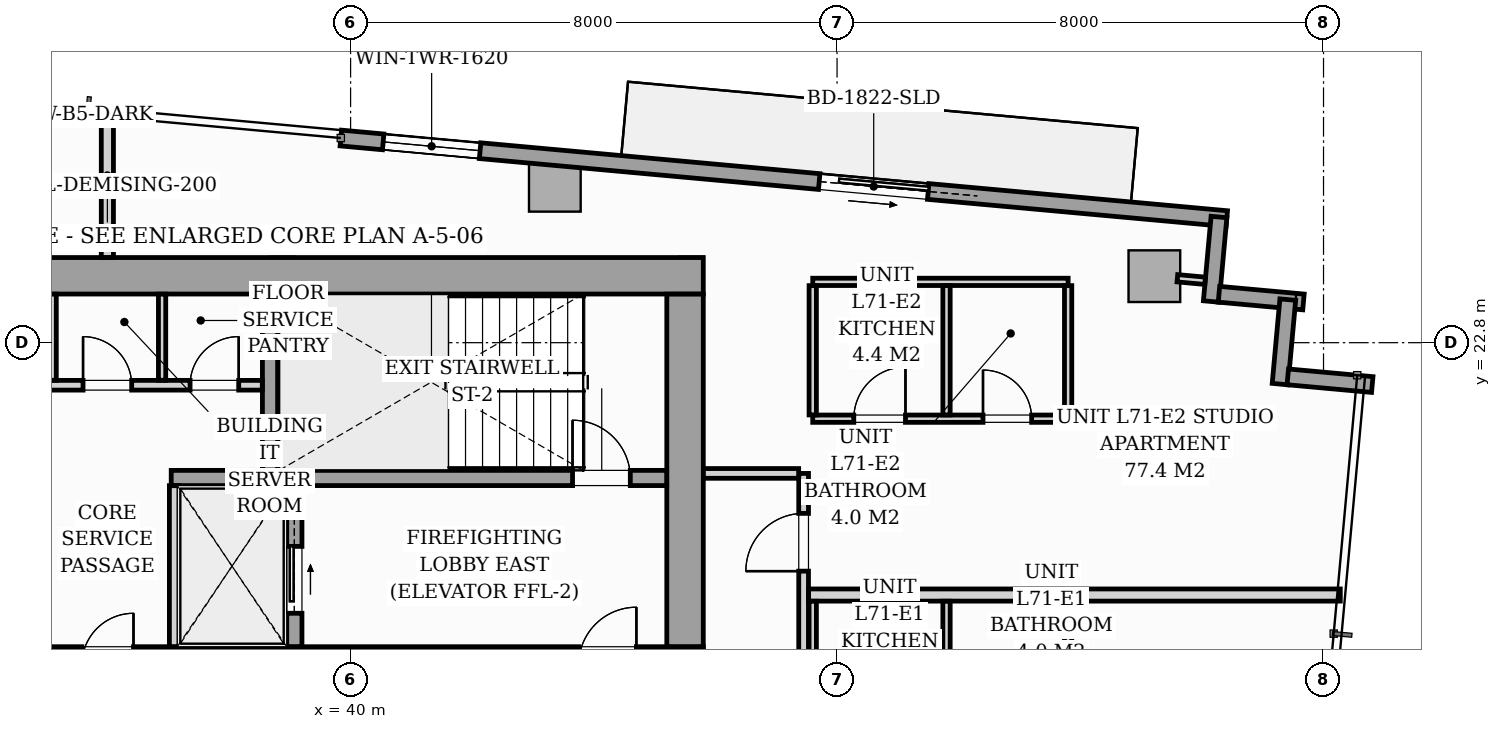
"""IFC4 building model, lengths in metres.
Left out: names, types, materials, properties, quantities, classifications, styles, units other than length and angle.
Written with IfcOpenShell. Run it as: python <this file> out.ifc"""

import sys

from ifc_helpers import new_model, si_unit, direction, frame, frame_2d, origin, origin_2d, place, context, subcontext, project, spatial, rectangle, i_section, extrude, source, transform, mapped, element, fill, save


model = new_model("IFC4")
c1 = context("Model", 3, precision=1e-05, world=origin(), true_north=direction((0.0, 1.0)))
c2 = subcontext(c1, "Body", "Model", "MODEL_VIEW")
j1 = project(units=[si_unit("LENGTHUNIT", "METRE"), si_unit("PLANEANGLEUNIT", "RADIAN")], contexts=[c1])
p1 = place(None, origin())
s1 = spatial("IfcSite", under=j1, at=p1, CompositionType="ELEMENT")
p2 = place(p1, origin())
s2 = spatial("IfcBuilding", under=s1, at=p2, CompositionType="ELEMENT")
p3 = place(p2, frame((0.0, 0.0, 246.3)))
s3 = spatial("IfcBuildingStorey", under=s2, at=p3, CompositionType="ELEMENT", Elevation=246.3)
m1 = source(origin(), c2, "Body", "SweptSolid", [
    extrude(i_section(OverallWidth=0.409, OverallDepth=0.425, WebThickness=0.033, FlangeThickness=0.052, FilletRadius=0.018, at=origin_2d()), origin(), (0.0, 0.0, 1.0), 3.296),
])
for number, where, z_axis, x_axis in (
    (1, (38.88, 24.0, 0.002), (0.0, 0.0, 1.0), (1.0, 0.0, 0.0)),
    (2, (45.6, 24.0, 0.002), (0.0, 0.0, 1.0), (1.0, 0.0, 0.0)),
):
    element("IfcColumn", number, at=place(p3, frame(where, z_axis=z_axis, x_axis=x_axis)), inside=s3, PredefinedType="PILASTER", context=c2, shape_type="MappedRepresentation", body=[
        mapped(m1, transform((0.0, 0.0, 0.0), scale=1.0)),
    ])
m2 = source(origin(), c2, "Body", "SweptSolid", [
    extrude(rectangle(XDim=0.85, YDim=0.85, at=origin_2d()), origin(), (0.0, 0.0, 1.0), 3.296),
])
for number, where, z_axis, x_axis in (
    (3, (43.359, 25.38, 0.002), (0.0, 0.0, 1.0), (0.996, -0.091, 0.0)),
    (4, (53.218, 23.894, 0.002), (0.0, 0.0, 1.0), (0.996, -0.091, 0.0)),
):
    element("IfcColumn", number, at=place(p3, frame(where, z_axis=z_axis, x_axis=x_axis)), inside=s3, PredefinedType="COLUMN", context=c2, shape_type="MappedRepresentation", body=[
        mapped(m2, transform((0.0, 0.0, 0.0), scale=1.0)),
    ])
p4 = place(p3, frame((39.839, 26.166, 0.0), z_axis=(0.0, 0.0, 1.0), x_axis=(0.995884447498, -0.090632043071, 0.0)))
e5 = element("IfcWall", 5, at=p4, inside=s3, PredefinedType="STANDARD", context=c2, shape_type="SweptSolid", body=[
    extrude(rectangle(XDim=14.63, YDim=0.26, at=frame_2d((7.315, 0.0))), origin(), (0.0, 0.0, 1.0), 3.04),
])
p5 = place(p4, frame((7.9, 0.0, 0.0)))
e6 = element("IfcOpeningElement", 6, at=p5, cuts=e5, PredefinedType="OPENING", context=c2, shape_type="SweptSolid", body=[
    extrude(rectangle(XDim=1.8, YDim=2.06, at=frame_2d((0.9, 1.03))), frame((0.0, 0.14, 0.0), z_axis=(0.0, -1.0, 0.0), x_axis=(1.0, 0.0, 0.0)), (0.0, 0.0, 1.0), 0.28),
])
p6 = place(p4, frame((0.7, 0.0, 0.65)))
e7 = element("IfcOpeningElement", 7, at=p6, cuts=e5, PredefinedType="OPENING", context=c2, shape_type="SweptSolid", body=[
    extrude(rectangle(XDim=1.6, YDim=1.5, at=frame_2d((0.8, 0.75))), frame((0.0, 0.14, 0.0), z_axis=(0.0, -1.0, 0.0), x_axis=(1.0, 0.0, 0.0)), (0.0, 0.0, 1.0), 0.28),
])
p7 = place(p3, frame((54.281, 24.866, 0.0), z_axis=(0.0, 0.0, 1.0), x_axis=(-0.090661991521, -0.995881721538, 0.0)))
e8 = element("IfcWall", 8, at=p7, inside=s3, PredefinedType="STANDARD", context=c2, shape_type="SweptSolid", body=[
    extrude(rectangle(XDim=1.395, YDim=0.26, at=frame_2d((0.698, 0.0))), origin(), (0.0, 0.0, 1.0), 3.04),
])
for number, where, z_axis, x_axis in (
    (9, (54.281, 23.596, 0.0), (0.0, 0.0, 1.0), (0.996, -0.091, 0.0)),
    (10, (55.412, 23.508, 0.0), (0.0, 0.0, 1.0), (-0.091, -0.996, 0.0)),
    (11, (55.412, 22.238, 0.0), (0.0, 0.0, 1.0), (0.996, -0.091, 0.0)),
):
    element("IfcWall", number, at=place(p3, frame(where, z_axis=z_axis, x_axis=x_axis)), inside=s3, PredefinedType="STANDARD", context=c2, shape_type="SweptSolid", body=[
        extrude(rectangle(XDim=1.395, YDim=0.26, at=frame_2d((0.698, 0.0))), origin(), (0.0, 0.0, 1.0), 3.04),
    ])
p8 = place(p3, frame((26.2, 17.5, 0.0), z_axis=(0.0, 0.0, 1.0), x_axis=(1.0, 0.0, 0.0)))
e12 = element("IfcWall", 12, at=p8, inside=s3, PredefinedType="SHEAR", context=c2, shape_type="SweptSolid", body=[
    extrude(rectangle(XDim=19.6, YDim=0.6, at=frame_2d((9.8, 0.0))), origin(), (0.0, 0.0, 1.0), 3.3),
])
p9 = place(p8, frame((0.95, 0.0, 0.0)))
e13 = element("IfcOpeningElement", 13, at=p9, cuts=e12, PredefinedType="OPENING", context=c2, shape_type="SweptSolid", body=[
    extrude(rectangle(XDim=0.95, YDim=2.06, at=frame_2d((0.475, 1.03))), frame((0.0, 0.31, 0.0), z_axis=(0.0, -1.0, 0.0), x_axis=(1.0, 0.0, 0.0)), (0.0, 0.0, 1.0), 0.62),
])
p10 = place(p8, frame((9.38, 0.0, 0.0)))
e14 = element("IfcOpeningElement", 14, at=p10, cuts=e12, PredefinedType="OPENING", context=c2, shape_type="SweptSolid", body=[
    extrude(rectangle(XDim=0.85, YDim=2.0, at=frame_2d((0.425, 1.0))), frame((0.0, 0.31, 0.0), z_axis=(0.0, -1.0, 0.0), x_axis=(1.0, 0.0, 0.0)), (0.0, 0.0, 1.0), 0.62),
])
p11 = place(p8, frame((17.55, 0.0, 0.0)))
e15 = element("IfcOpeningElement", 15, at=p11, cuts=e12, PredefinedType="OPENING", context=c2, shape_type="SweptSolid", body=[
    extrude(rectangle(XDim=0.95, YDim=2.06, at=frame_2d((0.475, 1.03))), frame((0.0, 0.31, 0.0), z_axis=(0.0, -1.0, 0.0), x_axis=(1.0, 0.0, 0.0)), (0.0, 0.0, 1.0), 0.62),
])
p12 = place(p3, frame((26.2, 23.9, 0.0), z_axis=(0.0, 0.0, 1.0), x_axis=(1.0, 0.0, 0.0)))
e16 = element("IfcWall", 16, at=p12, inside=s3, PredefinedType="SHEAR", context=c2, shape_type="SweptSolid", body=[
    extrude(rectangle(XDim=19.6, YDim=0.6, at=frame_2d((9.8, 0.0))), origin(), (0.0, 0.0, 1.0), 3.3),
])
p13 = place(p3, frame((45.5, 17.802, 0.0), z_axis=(0.0, 0.0, 1.0), x_axis=(0.0, 1.0, 0.0)))
e17 = element("IfcWall", 17, at=p13, inside=s3, PredefinedType="SHEAR", context=c2, shape_type="SweptSolid", body=[
    extrude(rectangle(XDim=5.796, YDim=0.6, at=frame_2d((2.898, 0.0))), origin(), (0.0, 0.0, 1.0), 3.3),
])
p14 = place(p3, frame((37.05, 20.575, 0.0), z_axis=(0.0, 0.0, 1.0), x_axis=(1.0, 0.0, 0.0)))
e18 = element("IfcWall", 18, at=p14, inside=s3, PredefinedType="SOLIDWALL", context=c2, shape_type="SweptSolid", body=[
    extrude(rectangle(XDim=8.148, YDim=0.25, at=frame_2d((4.074, 0.0))), origin(), (0.0, 0.0, 1.0), 3.3),
])
p15 = place(p14, frame((6.6, 0.0, 0.0)))
e19 = element("IfcOpeningElement", 19, at=p15, cuts=e18, PredefinedType="OPENING", context=c2, shape_type="SweptSolid", body=[
    extrude(rectangle(XDim=0.95, YDim=2.06, at=frame_2d((0.475, 1.03))), frame((0.0, 0.135, 0.0), z_axis=(0.0, -1.0, 0.0), x_axis=(1.0, 0.0, 0.0)), (0.0, 0.0, 1.0), 0.27),
])
p16 = place(p3, frame((38.675, 20.702, 0.0), z_axis=(0.0, 0.0, 1.0), x_axis=(0.0, 1.0, 0.0)))
e20 = element("IfcWall", 20, at=p16, inside=s3, PredefinedType="SOLIDWALL", context=c2, shape_type="SweptSolid", body=[
    extrude(rectangle(XDim=2.896, YDim=0.25, at=frame_2d((1.448, 0.0))), origin(), (0.0, 0.0, 1.0), 3.3),
])
p17 = place(p3, frame((37.1, 17.802, 0.0), z_axis=(0.0, 0.0, 1.0), x_axis=(0.0, 1.0, 0.0)))
e21 = element("IfcWall", 21, at=p17, inside=s3, PredefinedType="PARTITIONING", context=c2, shape_type="SweptSolid", body=[
    extrude(rectangle(XDim=2.646, YDim=0.16, at=frame_2d((1.323, 0.0))), origin(), (0.0, 0.0, 1.0), 3.04),
])
p18 = place(p3, frame((39.075, 17.802, 0.0), z_axis=(0.0, 0.0, 1.0), x_axis=(0.0, 1.0, 0.0)))
e22 = element("IfcWall", 22, at=p18, inside=s3, PredefinedType="SOLIDWALL", context=c2, shape_type="SweptSolid", body=[
    extrude(rectangle(XDim=2.646, YDim=0.25, at=frame_2d((1.323, 0.0))), origin(), (0.0, 0.0, 1.0), 3.3),
])
p19 = place(p18, frame((0.548, 0.0, 0.0)))
e23 = element("IfcOpeningElement", 23, at=p19, cuts=e22, PredefinedType="OPENING", context=c2, shape_type="SweptSolid", body=[
    extrude(rectangle(XDim=1.1, YDim=2.08, at=frame_2d((0.55, 1.04))), frame((0.0, 0.135, 0.0), z_axis=(0.0, -1.0, 0.0), x_axis=(1.0, 0.0, 0.0)), (0.0, 0.0, 1.0), 0.27),
])
p20 = place(p3, frame((33.452, 22.1, 0.0), z_axis=(0.0, 0.0, 1.0), x_axis=(1.0, 0.0, 0.0)))
e24 = element("IfcWall", 24, at=p20, inside=s3, PredefinedType="PARTITIONING", context=c2, shape_type="SweptSolid", body=[
    extrude(rectangle(XDim=5.096, YDim=0.16, at=frame_2d((2.548, 0.0))), origin(), (0.0, 0.0, 1.0), 3.04),
])
p21 = place(p20, frame((0.388, 0.0, 0.0)))
e25 = element("IfcOpeningElement", 25, at=p21, cuts=e24, PredefinedType="OPENING", context=c2, shape_type="SweptSolid", body=[
    extrude(rectangle(XDim=0.8, YDim=2.05, at=frame_2d((0.4, 1.025))), frame((0.0, 0.09, 0.0), z_axis=(0.0, -1.0, 0.0), x_axis=(1.0, 0.0, 0.0)), (0.0, 0.0, 1.0), 0.18),
])
p22 = place(p20, frame((2.148, 0.0, 0.0)))
e26 = element("IfcOpeningElement", 26, at=p22, cuts=e24, PredefinedType="OPENING", context=c2, shape_type="SweptSolid", body=[
    extrude(rectangle(XDim=0.8, YDim=2.05, at=frame_2d((0.4, 1.025))), frame((0.0, 0.09, 0.0), z_axis=(0.0, -1.0, 0.0), x_axis=(1.0, 0.0, 0.0)), (0.0, 0.0, 1.0), 0.18),
])
p23 = place(p20, frame((3.908, 0.0, 0.0)))
e27 = element("IfcOpeningElement", 27, at=p23, cuts=e24, PredefinedType="OPENING", context=c2, shape_type="SweptSolid", body=[
    extrude(rectangle(XDim=0.8, YDim=2.05, at=frame_2d((0.4, 1.025))), frame((0.0, 0.09, 0.0), z_axis=(0.0, -1.0, 0.0), x_axis=(1.0, 0.0, 0.0)), (0.0, 0.0, 1.0), 0.18),
])
for number, where, z_axis, x_axis in (
    (28, (35.1, 22.182, 0.0), (0.0, 0.0, 1.0), (0.0, 1.0, 0.0)),
    (29, (36.9, 22.182, 0.0), (0.0, 0.0, 1.0), (0.0, 1.0, 0.0)),
):
    element("IfcWall", number, at=place(p3, frame(where, z_axis=z_axis, x_axis=x_axis)), inside=s3, PredefinedType="PARTITIONING", context=c2, shape_type="SweptSolid", body=[
        extrude(rectangle(XDim=1.416, YDim=0.12, at=frame_2d((0.708, 0.0))), origin(), (0.0, 0.0, 1.0), 3.04),
    ])
p24 = place(p3, frame((47.45, 13.362, 0.0), z_axis=(0.0, 0.0, 1.0), x_axis=(0.0, 1.0, 0.0)))
e30 = element("IfcWall", 30, at=p24, inside=s3, PredefinedType="PARTITIONING", context=c2, shape_type="SweptSolid", body=[
    extrude(rectangle(XDim=7.288, YDim=0.16, at=frame_2d((3.644, 0.0))), origin(), (0.0, 0.0, 1.0), 3.04),
])
p25 = place(p24, frame((0.493, 0.0, 0.0)))
e31 = element("IfcOpeningElement", 31, at=p25, cuts=e30, PredefinedType="OPENING", context=c2, shape_type="SweptSolid", body=[
    extrude(rectangle(XDim=0.95, YDim=2.06, at=frame_2d((0.475, 1.03))), frame((0.0, 0.09, 0.0), z_axis=(0.0, -1.0, 0.0), x_axis=(1.0, 0.0, 0.0)), (0.0, 0.0, 1.0), 0.18),
])
p26 = place(p24, frame((5.681, 0.0, 0.0)))
e32 = element("IfcOpeningElement", 32, at=p26, cuts=e30, PredefinedType="OPENING", context=c2, shape_type="SweptSolid", body=[
    extrude(rectangle(XDim=0.95, YDim=2.06, at=frame_2d((0.475, 1.03))), frame((0.0, 0.09, 0.0), z_axis=(0.0, -1.0, 0.0), x_axis=(1.0, 0.0, 0.0)), (0.0, 0.0, 1.0), 0.18),
])
p27 = place(p3, frame((36.0, 24.202, 0.0), z_axis=(0.0, 0.0, 1.0), x_axis=(0.0, 1.0, 0.0)))
e33 = element("IfcWall", 33, at=p27, inside=s3, PredefinedType="PARTITIONING", context=c2, shape_type="SweptSolid", body=[
    extrude(rectangle(XDim=2.363, YDim=0.2, at=frame_2d((1.182, 0.0))), origin(), (0.0, 0.0, 1.0), 3.04),
])
p28 = place(p3, frame((45.802, 20.65, 0.0), z_axis=(0.0, 0.0, 1.0), x_axis=(1.0, 0.0, 0.0)))
e34 = element("IfcWall", 34, at=p28, inside=s3, PredefinedType="PARTITIONING", context=c2, shape_type="SweptSolid", body=[
    extrude(rectangle(XDim=1.566, YDim=0.16, at=frame_2d((0.783, 0.0))), origin(), (0.0, 0.0, 1.0), 3.04),
])
p29 = place(p3, frame((47.532, 18.65, 0.0), z_axis=(0.0, 0.0, 1.0), x_axis=(1.0, 0.0, 0.0)))
e35 = element("IfcWall", 35, at=p29, inside=s3, PredefinedType="PARTITIONING", context=c2, shape_type="SweptSolid", body=[
    extrude(rectangle(XDim=8.743, YDim=0.2, at=frame_2d((4.372, 0.0))), origin(), (0.0, 0.0, 1.0), 3.04),
])
for number, where, z_axis, x_axis in (
    (36, (47.6, 16.362, 0.0), (0.0, 0.0, 1.0), (0.0, 1.0, 0.0)),
    (37, (49.8, 16.362, 0.0), (0.0, 0.0, 1.0), (0.0, 1.0, 0.0)),
    (38, (51.8, 16.362, 0.0), (0.0, 0.0, 1.0), (0.0, 1.0, 0.0)),
):
    element("IfcWall", number, at=place(p3, frame(where, z_axis=z_axis, x_axis=x_axis)), inside=s3, PredefinedType="PARTITIONING", context=c2, shape_type="SweptSolid", body=[
        extrude(rectangle(XDim=2.186, YDim=0.12, at=frame_2d((1.093, 0.0))), origin(), (0.0, 0.0, 1.0), 3.04),
    ])
p30 = place(p3, frame((47.6, 21.55, 0.0), z_axis=(0.0, 0.0, 1.0), x_axis=(1.0, 0.0, 0.0)))
e39 = element("IfcWall", 39, at=p30, inside=s3, PredefinedType="PARTITIONING", context=c2, shape_type="SweptSolid", body=[
    extrude(rectangle(XDim=4.2, YDim=0.12, at=frame_2d((2.1, 0.0))), origin(), (0.0, 0.0, 1.0), 3.04),
])
p31 = place(p30, frame((0.675, 0.0, 0.0)))
e40 = element("IfcOpeningElement", 40, at=p31, cuts=e39, PredefinedType="OPENING", context=c2, shape_type="SweptSolid", body=[
    extrude(rectangle(XDim=0.85, YDim=2.05, at=frame_2d((0.425, 1.025))), frame((0.0, 0.07, 0.0), z_axis=(0.0, -1.0, 0.0), x_axis=(1.0, 0.0, 0.0)), (0.0, 0.0, 1.0), 0.14),
])
p32 = place(p30, frame((2.8, 0.0, 0.0)))
e41 = element("IfcOpeningElement", 41, at=p32, cuts=e39, PredefinedType="OPENING", context=c2, shape_type="SweptSolid", body=[
    extrude(rectangle(XDim=0.8, YDim=2.02, at=frame_2d((0.4, 1.01))), frame((0.0, 0.07, 0.0), z_axis=(0.0, -1.0, 0.0), x_axis=(1.0, 0.0, 0.0)), (0.0, 0.0, 1.0), 0.14),
])
p33 = place(p3, frame((47.6, 23.8, 0.0), z_axis=(0.0, 0.0, 1.0), x_axis=(1.0, 0.0, 0.0)))
e42 = element("IfcWall", 42, at=p33, inside=s3, PredefinedType="PARTITIONING", context=c2, shape_type="SweptSolid", body=[
    extrude(rectangle(XDim=4.2, YDim=0.12, at=frame_2d((2.1, 0.0))), origin(), (0.0, 0.0, 1.0), 3.04),
])
for number, where, z_axis, x_axis in (
    (43, (47.6, 21.612, 0.0), (0.0, 0.0, 1.0), (0.0, 1.0, 0.0)),
    (44, (49.8, 21.612, 0.0), (0.0, 0.0, 1.0), (0.0, 1.0, 0.0)),
    (45, (51.8, 21.612, 0.0), (0.0, 0.0, 1.0), (0.0, 1.0, 0.0)),
):
    element("IfcWall", number, at=place(p3, frame(where, z_axis=z_axis, x_axis=x_axis)), inside=s3, PredefinedType="PARTITIONING", context=c2, shape_type="SweptSolid", body=[
        extrude(rectangle(XDim=2.126, YDim=0.12, at=frame_2d((1.063, 0.0))), origin(), (0.0, 0.0, 1.0), 3.04),
    ])
p34 = place(p3, frame((53.597, 23.859, 0.0), z_axis=(0.0, 0.0, 1.0), x_axis=(0.995884462012, -0.090631883588, 0.0)))
e46 = element("IfcWall", 46, at=p34, inside=s3, PredefinedType="PARTITIONING", context=c2, shape_type="SweptSolid", body=[
    extrude(rectangle(XDim=0.458, YDim=0.12, at=frame_2d((0.229, 0.0))), origin(), (0.0, 0.0, 1.0), 3.04),
])
m3 = source(origin(), c2, "Body", "SweptSolid", [
    extrude(rectangle(XDim=1.8, YDim=2.06, at=frame_2d((0.9, 1.03))), frame((0.0, 0.025, 0.0), z_axis=(0.0, -1.0, 0.0), x_axis=(1.0, 0.0, 0.0)), (0.0, 0.0, 1.0), 0.05),
])
p35 = place(p5, origin())
e47 = element("IfcDoor", 47, at=p35, inside=s3, OperationType="SLIDING_TO_RIGHT", PredefinedType="DOOR", context=c2, shape_type="MappedRepresentation", body=[
    mapped(m3, transform((0.0, 0.0, 0.0), scale=1.0)),
])
fill(e6, e47)
m4 = source(origin(), c2, "Body", "SweptSolid", [
    extrude(rectangle(XDim=1.6, YDim=1.5, at=frame_2d((0.8, 0.75))), frame((0.0, 0.03, 0.0), z_axis=(0.0, -1.0, 0.0), x_axis=(1.0, 0.0, 0.0)), (0.0, 0.0, 1.0), 0.06),
])
p36 = place(p6, origin())
e48 = element("IfcWindow", 48, at=p36, inside=s3, PartitioningType="SINGLE_PANEL", PredefinedType="WINDOW", context=c2, shape_type="MappedRepresentation", body=[
    mapped(m4, transform((0.0, 0.0, 0.0), scale=1.0)),
])
fill(e7, e48)
m5 = source(origin(), c2, "Body", "SweptSolid", [
    extrude(rectangle(XDim=0.95, YDim=2.06, at=frame_2d((0.475, 1.03))), frame((0.0, 0.025, 0.0), z_axis=(0.0, -1.0, 0.0), x_axis=(1.0, 0.0, 0.0)), (0.0, 0.0, 1.0), 0.05),
])
p37 = place(p15, origin())
e49 = element("IfcDoor", 49, at=p37, inside=s3, OperationType="SINGLE_SWING_LEFT", PredefinedType="DOOR", context=c2, shape_type="MappedRepresentation", body=[
    mapped(m5, transform((0.0, 0.0, 0.0), scale=1.0)),
])
fill(e19, e49)
m6 = source(origin(), c2, "Body", "SweptSolid", [
    extrude(rectangle(XDim=1.1, YDim=2.08, at=frame_2d((0.55, 1.04))), frame((0.0, 0.025, 0.0), z_axis=(0.0, -1.0, 0.0), x_axis=(1.0, 0.0, 0.0)), (0.0, 0.0, 1.0), 0.05),
])
p38 = place(p19, origin())
e50 = element("IfcDoor", 50, at=p38, inside=s3, OperationType="SLIDING_TO_RIGHT", PredefinedType="DOOR", context=c2, shape_type="MappedRepresentation", body=[
    mapped(m6, transform((0.0, 0.0, 0.0), scale=1.0)),
])
fill(e23, e50)
m7 = source(origin(), c2, "Body", "SweptSolid", [
    extrude(rectangle(XDim=0.8, YDim=2.05, at=frame_2d((0.4, 1.025))), frame((0.0, 0.025, 0.0), z_axis=(0.0, -1.0, 0.0), x_axis=(1.0, 0.0, 0.0)), (0.0, 0.0, 1.0), 0.05),
])
p39 = place(p22, origin())
e51 = element("IfcDoor", 51, at=p39, inside=s3, OperationType="SINGLE_SWING_LEFT", PredefinedType="DOOR", context=c2, shape_type="MappedRepresentation", body=[
    mapped(m7, transform((0.0, 0.0, 0.0), scale=1.0)),
])
fill(e26, e51)
p40 = place(p23, origin())
e52 = element("IfcDoor", 52, at=p40, inside=s3, OperationType="SINGLE_SWING_RIGHT", PredefinedType="DOOR", context=c2, shape_type="MappedRepresentation", body=[
    mapped(m7, transform((0.0, 0.0, 0.0), scale=1.0)),
])
fill(e27, e52)
m8 = source(origin(), c2, "Body", "SweptSolid", [
    extrude(rectangle(XDim=0.95, YDim=2.06, at=frame_2d((0.475, 1.03))), frame((0.0, 0.025, 0.0), z_axis=(0.0, -1.0, 0.0), x_axis=(1.0, 0.0, 0.0)), (0.0, 0.0, 1.0), 0.05),
])
p41 = place(p26, origin())
e53 = element("IfcDoor", 53, at=p41, inside=s3, OperationType="SINGLE_SWING_LEFT", PredefinedType="DOOR", context=c2, shape_type="MappedRepresentation", body=[
    mapped(m8, transform((0.0, 0.0, 0.0), scale=1.0)),
])
fill(e32, e53)
m9 = source(origin(), c2, "Body", "SweptSolid", [
    extrude(rectangle(XDim=0.85, YDim=2.05, at=frame_2d((0.425, 1.025))), frame((0.0, 0.025, 0.0), z_axis=(0.0, -1.0, 0.0), x_axis=(1.0, 0.0, 0.0)), (0.0, 0.0, 1.0), 0.05),
])
p42 = place(p31, origin())
e54 = element("IfcDoor", 54, at=p42, inside=s3, OperationType="SINGLE_SWING_RIGHT", PredefinedType="DOOR", context=c2, shape_type="MappedRepresentation", body=[
    mapped(m9, transform((0.0, 0.0, 0.0), scale=1.0)),
])
fill(e40, e54)
m10 = source(origin(), c2, "Body", "SweptSolid", [
    extrude(rectangle(XDim=0.8, YDim=2.02, at=frame_2d((0.4, 1.01))), frame((0.0, 0.025, 0.0), z_axis=(0.0, -1.0, 0.0), x_axis=(1.0, 0.0, 0.0)), (0.0, 0.0, 1.0), 0.05),
])
p43 = place(p32, origin())
e55 = element("IfcDoor", 55, at=p43, inside=s3, OperationType="SINGLE_SWING_LEFT", PredefinedType="DOOR", context=c2, shape_type="MappedRepresentation", body=[
    mapped(m10, transform((0.0, 0.0, 0.0), scale=1.0)),
])
fill(e41, e55)
save(model, sys.argv[1])
